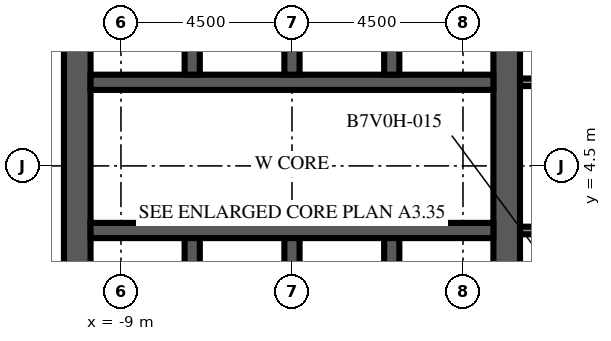
"""IFC4 building model, lengths in metres.
Left out: names, types, materials, properties, quantities, classifications, styles, units other than length and angle.
Written with IfcOpenShell. Run it as: python <this file> out.ifc"""

import sys

from ifc_helpers import new_model, si_unit, direction, frame, frame_2d, origin, place, context, subcontext, project, spatial, rectangle, extrude, element, fill, save


model = new_model("IFC4")
c1 = context("Model", 3, precision=1e-05, world=origin(), true_north=direction((0.0, 1.0)))
c2 = subcontext(c1, "Body", "Model", "MODEL_VIEW")
j1 = project(units=[si_unit("LENGTHUNIT", "METRE"), si_unit("PLANEANGLEUNIT", "RADIAN")], contexts=[c1])
p1 = place(None, origin())
s1 = spatial("IfcSite", under=j1, at=p1, CompositionType="ELEMENT")
p2 = place(p1, origin())
s2 = spatial("IfcBuilding", under=s1, at=p2, CompositionType="ELEMENT")
p3 = place(p2, frame((0.0, 0.0, 231.6)))
s3 = spatial("IfcBuildingStorey", under=s2, at=p3, CompositionType="ELEMENT", Elevation=231.6)
p4 = place(p3, frame((-10.15, -9.0, 0.0), z_axis=(0.0, 0.0, 1.0), x_axis=(0.0, 1.0, 0.0)))
e1 = element("IfcWall", 1, at=p4, inside=s3, PredefinedType="SHEAR", context=c2, shape_type="SweptSolid", body=[
    extrude(rectangle(XDim=27.5, YDim=0.7, at=frame_2d((13.75, 0.0))), origin(), (0.0, 0.0, 1.0), 4.1),
])
p5 = place(p4, frame((12.55, 0.0, 0.0)))
e2 = element("IfcOpeningElement", 2, at=p5, cuts=e1, PredefinedType="OPENING", context=c2, shape_type="SweptSolid", body=[
    extrude(rectangle(XDim=2.4, YDim=2.4, at=frame_2d((1.2, 1.2))), frame((0.0, 0.36, 0.0), z_axis=(0.0, -1.0, 0.0), x_axis=(1.0, 0.0, 0.0)), (0.0, 0.0, 1.0), 0.72),
])
p6 = place(p4, frame((6.825, 0.0, 0.0)))
e3 = element("IfcOpeningElement", 3, at=p6, cuts=e1, PredefinedType="OPENING", context=c2, shape_type="SweptSolid", body=[
    extrude(rectangle(XDim=1.2, YDim=2.1, at=frame_2d((0.6, 1.05))), frame((0.0, 0.36, 0.0), z_axis=(0.0, -1.0, 0.0), x_axis=(1.0, 0.0, 0.0)), (0.0, 0.0, 1.0), 0.72),
])
p7 = place(p4, frame((19.475, 0.0, 0.0)))
e4 = element("IfcOpeningElement", 4, at=p7, cuts=e1, PredefinedType="OPENING", context=c2, shape_type="SweptSolid", body=[
    extrude(rectangle(XDim=1.2, YDim=2.1, at=frame_2d((0.6, 1.05))), frame((0.0, 0.36, 0.0), z_axis=(0.0, -1.0, 0.0), x_axis=(1.0, 0.0, 0.0)), (0.0, 0.0, 1.0), 0.72),
])
p8 = place(p3, frame((1.15, -9.0, 0.0), z_axis=(0.0, 0.0, 1.0), x_axis=(0.0, 1.0, 0.0)))
e5 = element("IfcWall", 5, at=p8, inside=s3, PredefinedType="SHEAR", context=c2, shape_type="SweptSolid", body=[
    extrude(rectangle(XDim=27.5, YDim=0.7, at=frame_2d((13.75, 0.0))), origin(), (0.0, 0.0, 1.0), 4.1),
])
p9 = place(p8, frame((12.55, 0.0, 0.0)))
e6 = element("IfcOpeningElement", 6, at=p9, cuts=e5, PredefinedType="OPENING", context=c2, shape_type="SweptSolid", body=[
    extrude(rectangle(XDim=2.4, YDim=2.4, at=frame_2d((1.2, 1.2))), frame((0.0, 0.36, 0.0), z_axis=(0.0, -1.0, 0.0), x_axis=(1.0, 0.0, 0.0)), (0.0, 0.0, 1.0), 0.72),
])
p10 = place(p8, frame((5.42, 0.0, 0.0)))
e7 = element("IfcOpeningElement", 7, at=p10, cuts=e5, PredefinedType="OPENING", context=c2, shape_type="SweptSolid", body=[
    extrude(rectangle(XDim=1.2, YDim=2.1, at=frame_2d((0.6, 1.05))), frame((0.0, 0.36, 0.0), z_axis=(0.0, -1.0, 0.0), x_axis=(1.0, 0.0, 0.0)), (0.0, 0.0, 1.0), 0.72),
])
p11 = place(p8, frame((19.46, 0.0, 0.0)))
e8 = element("IfcOpeningElement", 8, at=p11, cuts=e5, PredefinedType="OPENING", context=c2, shape_type="SweptSolid", body=[
    extrude(rectangle(XDim=1.0, YDim=2.1, at=frame_2d((0.5, 1.05))), frame((0.0, 0.36, 0.0), z_axis=(0.0, -1.0, 0.0), x_axis=(1.0, 0.0, 0.0)), (0.0, 0.0, 1.0), 0.72),
])
p12 = place(p8, frame((21.17, 0.0, 0.0)))
e9 = element("IfcOpeningElement", 9, at=p12, cuts=e5, PredefinedType="OPENING", context=c2, shape_type="SweptSolid", body=[
    extrude(rectangle(XDim=1.0, YDim=2.1, at=frame_2d((0.5, 1.05))), frame((0.0, 0.36, 0.0), z_axis=(0.0, -1.0, 0.0), x_axis=(1.0, 0.0, 0.0)), (0.0, 0.0, 1.0), 0.72),
])
p13 = place(p8, frame((23.26, 0.0, 0.0)))
e10 = element("IfcOpeningElement", 10, at=p13, cuts=e5, PredefinedType="OPENING", context=c2, shape_type="SweptSolid", body=[
    extrude(rectangle(XDim=1.0, YDim=2.1, at=frame_2d((0.5, 1.05))), frame((0.0, 0.36, 0.0), z_axis=(0.0, -1.0, 0.0), x_axis=(1.0, 0.0, 0.0)), (0.0, 0.0, 1.0), 0.72),
])
p14 = place(p8, frame((25.35, 0.0, 0.0)))
e11 = element("IfcOpeningElement", 11, at=p14, cuts=e5, PredefinedType="OPENING", context=c2, shape_type="SweptSolid", body=[
    extrude(rectangle(XDim=1.0, YDim=2.1, at=frame_2d((0.5, 1.05))), frame((0.0, 0.36, 0.0), z_axis=(0.0, -1.0, 0.0), x_axis=(1.0, 0.0, 0.0)), (0.0, 0.0, 1.0), 0.72),
])
p15 = place(p3, frame((-9.8, 2.8, 0.0), z_axis=(0.0, 0.0, 1.0), x_axis=(1.0, 0.0, 0.0)))
e12 = element("IfcWall", 12, at=p15, inside=s3, PredefinedType="SHEAR", context=c2, shape_type="SweptSolid", body=[
    extrude(rectangle(XDim=10.6, YDim=0.4, at=frame_2d((5.3, 0.0))), origin(), (0.0, 0.0, 1.0), 4.1),
])
p16 = place(p15, frame((0.688, 0.0, 0.0)))
e13 = element("IfcOpeningElement", 13, at=p16, cuts=e12, PredefinedType="OPENING", context=c2, shape_type="SweptSolid", body=[
    extrude(rectangle(XDim=1.1, YDim=2.1, at=frame_2d((0.55, 1.05))), frame((0.0, 0.21, 0.0), z_axis=(0.0, -1.0, 0.0), x_axis=(1.0, 0.0, 0.0)), (0.0, 0.0, 1.0), 0.42),
])
p17 = place(p15, frame((3.438, 0.0, 0.0)))
e14 = element("IfcOpeningElement", 14, at=p17, cuts=e12, PredefinedType="OPENING", context=c2, shape_type="SweptSolid", body=[
    extrude(rectangle(XDim=1.1, YDim=2.1, at=frame_2d((0.55, 1.05))), frame((0.0, 0.21, 0.0), z_axis=(0.0, -1.0, 0.0), x_axis=(1.0, 0.0, 0.0)), (0.0, 0.0, 1.0), 0.42),
])
p18 = place(p15, frame((6.113, 0.0, 0.0)))
e15 = element("IfcOpeningElement", 15, at=p18, cuts=e12, PredefinedType="OPENING", context=c2, shape_type="SweptSolid", body=[
    extrude(rectangle(XDim=1.0, YDim=2.1, at=frame_2d((0.5, 1.05))), frame((0.0, 0.21, 0.0), z_axis=(0.0, -1.0, 0.0), x_axis=(1.0, 0.0, 0.0)), (0.0, 0.0, 1.0), 0.42),
])
p19 = place(p15, frame((8.863, 0.0, 0.0)))
e16 = element("IfcOpeningElement", 16, at=p19, cuts=e12, PredefinedType="OPENING", context=c2, shape_type="SweptSolid", body=[
    extrude(rectangle(XDim=1.0, YDim=2.1, at=frame_2d((0.5, 1.05))), frame((0.0, 0.21, 0.0), z_axis=(0.0, -1.0, 0.0), x_axis=(1.0, 0.0, 0.0)), (0.0, 0.0, 1.0), 0.42),
])
p20 = place(p3, frame((-9.8, 6.7, 0.0), z_axis=(0.0, 0.0, 1.0), x_axis=(1.0, 0.0, 0.0)))
e17 = element("IfcWall", 17, at=p20, inside=s3, PredefinedType="SHEAR", context=c2, shape_type="SweptSolid", body=[
    extrude(rectangle(XDim=10.6, YDim=0.4, at=frame_2d((5.3, 0.0))), origin(), (0.0, 0.0, 1.0), 4.1),
])
p21 = place(p20, frame((3.438, 0.0, 0.0)))
e18 = element("IfcOpeningElement", 18, at=p21, cuts=e17, PredefinedType="OPENING", context=c2, shape_type="SweptSolid", body=[
    extrude(rectangle(XDim=1.1, YDim=2.1, at=frame_2d((0.55, 1.05))), frame((0.0, 0.21, 0.0), z_axis=(0.0, -1.0, 0.0), x_axis=(1.0, 0.0, 0.0)), (0.0, 0.0, 1.0), 0.42),
])
p22 = place(p20, frame((6.062, 0.0, 0.0)))
e19 = element("IfcOpeningElement", 19, at=p22, cuts=e17, PredefinedType="OPENING", context=c2, shape_type="SweptSolid", body=[
    extrude(rectangle(XDim=1.1, YDim=2.1, at=frame_2d((0.55, 1.05))), frame((0.0, 0.21, 0.0), z_axis=(0.0, -1.0, 0.0), x_axis=(1.0, 0.0, 0.0)), (0.0, 0.0, 1.0), 0.42),
])
p23 = place(p20, frame((8.812, 0.0, 0.0)))
e20 = element("IfcOpeningElement", 20, at=p23, cuts=e17, PredefinedType="OPENING", context=c2, shape_type="SweptSolid", body=[
    extrude(rectangle(XDim=1.1, YDim=2.1, at=frame_2d((0.55, 1.05))), frame((0.0, 0.21, 0.0), z_axis=(0.0, -1.0, 0.0), x_axis=(1.0, 0.0, 0.0)), (0.0, 0.0, 1.0), 0.42),
])
p24 = place(p20, frame((0.738, 0.0, 0.0)))
e21 = element("IfcOpeningElement", 21, at=p24, cuts=e17, PredefinedType="OPENING", context=c2, shape_type="SweptSolid", body=[
    extrude(rectangle(XDim=1.0, YDim=2.1, at=frame_2d((0.5, 1.05))), frame((0.0, 0.21, 0.0), z_axis=(0.0, -1.0, 0.0), x_axis=(1.0, 0.0, 0.0)), (0.0, 0.0, 1.0), 0.42),
])
for number, where, z_axis, x_axis in (
    (22, (-7.125, -0.3, 0.0), (0.0, 0.0, 1.0), (0.0, 1.0, 0.0)),
    (23, (-7.125, 6.9, 0.0), (0.0, 0.0, 1.0), (0.0, 1.0, 0.0)),
    (24, (-4.5, -0.3, 0.0), (0.0, 0.0, 1.0), (0.0, 1.0, 0.0)),
    (25, (-4.5, 6.9, 0.0), (0.0, 0.0, 1.0), (0.0, 1.0, 0.0)),
    (26, (-1.875, -0.3, 0.0), (0.0, 0.0, 1.0), (0.0, 1.0, 0.0)),
    (27, (-1.875, 6.9, 0.0), (0.0, 0.0, 1.0), (0.0, 1.0, 0.0)),
):
    element("IfcWall", number, at=place(p3, frame(where, z_axis=z_axis, x_axis=x_axis)), inside=s3, PredefinedType="SHEAR", context=c2, shape_type="SweptSolid", body=[
        extrude(rectangle(XDim=2.9, YDim=0.4, at=frame_2d((1.45, 0.0))), origin(), (0.0, 0.0, 1.0), 4.1),
    ])
for number, where, z_axis, x_axis in (
    (28, (1.5, 2.8, 0.0), (0.0, 0.0, 1.0), (1.0, 0.0, 0.0)),
    (29, (1.5, 6.7, 0.0), (0.0, 0.0, 1.0), (1.0, 0.0, 0.0)),
):
    element("IfcWall", number, at=place(p3, frame(where, z_axis=z_axis, x_axis=x_axis)), inside=s3, PredefinedType="PARTITIONING", context=c2, shape_type="SweptSolid", body=[
        extrude(rectangle(XDim=1.5, YDim=0.2, at=frame_2d((0.75, 0.0))), origin(), (0.0, 0.0, 1.0), 3.65),
    ])
p25 = place(p16, origin())
e30 = element("IfcDoor", 30, at=p25, inside=s3, OperationType="DOUBLE_DOOR_SLIDING", PredefinedType="DOOR", context=c2, shape_type="SweptSolid", body=[
    extrude(rectangle(XDim=1.1, YDim=2.1, at=frame_2d((0.55, 1.05))), frame((0.0, 0.025, 0.0), z_axis=(0.0, -1.0, 0.0), x_axis=(1.0, 0.0, 0.0)), (0.0, 0.0, 1.0), 0.05),
])
fill(e13, e30)
p26 = place(p17, origin())
e31 = element("IfcDoor", 31, at=p26, inside=s3, OperationType="DOUBLE_DOOR_SLIDING", PredefinedType="DOOR", context=c2, shape_type="SweptSolid", body=[
    extrude(rectangle(XDim=1.1, YDim=2.1, at=frame_2d((0.55, 1.05))), frame((0.0, 0.025, 0.0), z_axis=(0.0, -1.0, 0.0), x_axis=(1.0, 0.0, 0.0)), (0.0, 0.0, 1.0), 0.05),
])
fill(e14, e31)
p27 = place(p21, origin())
e32 = element("IfcDoor", 32, at=p27, inside=s3, OperationType="DOUBLE_DOOR_SLIDING", PredefinedType="DOOR", context=c2, shape_type="SweptSolid", body=[
    extrude(rectangle(XDim=1.1, YDim=2.1, at=frame_2d((0.55, 1.05))), frame((0.0, 0.025, 0.0), z_axis=(0.0, -1.0, 0.0), x_axis=(1.0, 0.0, 0.0)), (0.0, 0.0, 1.0), 0.05),
])
fill(e18, e32)
p28 = place(p22, origin())
e33 = element("IfcDoor", 33, at=p28, inside=s3, OperationType="DOUBLE_DOOR_SLIDING", PredefinedType="DOOR", context=c2, shape_type="SweptSolid", body=[
    extrude(rectangle(XDim=1.1, YDim=2.1, at=frame_2d((0.55, 1.05))), frame((0.0, 0.025, 0.0), z_axis=(0.0, -1.0, 0.0), x_axis=(1.0, 0.0, 0.0)), (0.0, 0.0, 1.0), 0.05),
])
fill(e19, e33)
p29 = place(p23, origin())
e34 = element("IfcDoor", 34, at=p29, inside=s3, OperationType="DOUBLE_DOOR_SLIDING", PredefinedType="DOOR", context=c2, shape_type="SweptSolid", body=[
    extrude(rectangle(XDim=1.1, YDim=2.1, at=frame_2d((0.55, 1.05))), frame((0.0, 0.025, 0.0), z_axis=(0.0, -1.0, 0.0), x_axis=(1.0, 0.0, 0.0)), (0.0, 0.0, 1.0), 0.05),
])
fill(e20, e34)
p30 = place(p5, origin())
e35 = element("IfcDoor", 35, at=p30, inside=s3, OperationType="DOUBLE_DOOR_DOUBLE_SWING", PredefinedType="DOOR", context=c2, shape_type="SweptSolid", body=[
    extrude(rectangle(XDim=2.4, YDim=2.4, at=frame_2d((1.2, 1.2))), frame((0.0, 0.025, 0.0), z_axis=(0.0, -1.0, 0.0), x_axis=(1.0, 0.0, 0.0)), (0.0, 0.0, 1.0), 0.05),
])
fill(e2, e35)
p31 = place(p9, origin())
e36 = element("IfcDoor", 36, at=p31, inside=s3, OperationType="DOUBLE_DOOR_DOUBLE_SWING", PredefinedType="DOOR", context=c2, shape_type="SweptSolid", body=[
    extrude(rectangle(XDim=2.4, YDim=2.4, at=frame_2d((1.2, 1.2))), frame((0.0, 0.025, 0.0), z_axis=(0.0, -1.0, 0.0), x_axis=(1.0, 0.0, 0.0)), (0.0, 0.0, 1.0), 0.05),
])
fill(e6, e36)
p32 = place(p18, origin())
e37 = element("IfcDoor", 37, at=p32, inside=s3, OperationType="SINGLE_SWING_LEFT", PredefinedType="DOOR", context=c2, shape_type="SweptSolid", body=[
    extrude(rectangle(XDim=1.0, YDim=2.1, at=frame_2d((0.5, 1.05))), frame((0.0, 0.025, 0.0), z_axis=(0.0, -1.0, 0.0), x_axis=(1.0, 0.0, 0.0)), (0.0, 0.0, 1.0), 0.05),
])
fill(e15, e37)
p33 = place(p19, origin())
e38 = element("IfcDoor", 38, at=p33, inside=s3, OperationType="SINGLE_SWING_RIGHT", PredefinedType="DOOR", context=c2, shape_type="SweptSolid", body=[
    extrude(rectangle(XDim=1.0, YDim=2.1, at=frame_2d((0.5, 1.05))), frame((0.0, 0.025, 0.0), z_axis=(0.0, -1.0, 0.0), x_axis=(1.0, 0.0, 0.0)), (0.0, 0.0, 1.0), 0.05),
])
fill(e16, e38)
p34 = place(p24, origin())
e39 = element("IfcDoor", 39, at=p34, inside=s3, OperationType="SINGLE_SWING_LEFT", PredefinedType="DOOR", context=c2, shape_type="SweptSolid", body=[
    extrude(rectangle(XDim=1.0, YDim=2.1, at=frame_2d((0.5, 1.05))), frame((0.0, 0.025, 0.0), z_axis=(0.0, -1.0, 0.0), x_axis=(1.0, 0.0, 0.0)), (0.0, 0.0, 1.0), 0.05),
])
fill(e21, e39)
save(model, sys.argv[1])
